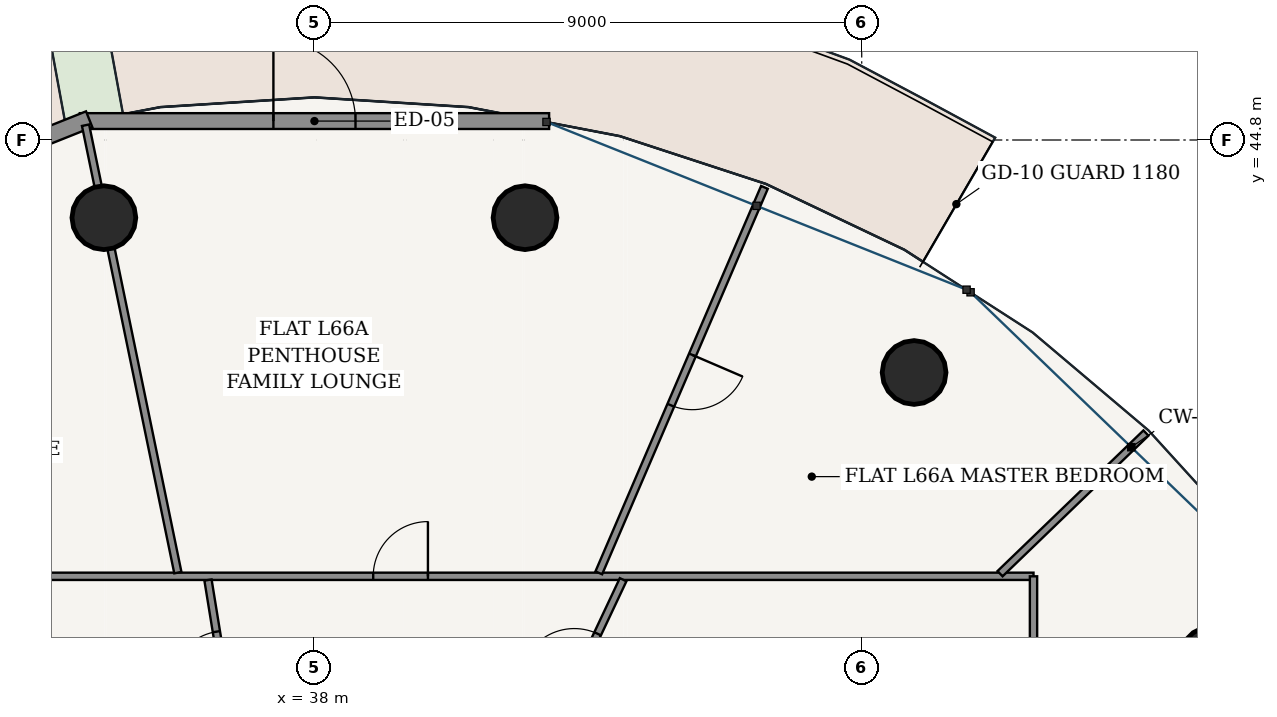
"""IFC4 building model, lengths in metres.
Left out: names, types, materials, properties, quantities, classifications, styles, units other than length and angle.
Written with IfcOpenShell. Run it as: python <this file> out.ifc"""

import sys

from ifc_helpers import new_model, si_unit, direction, frame, frame_2d, origin, origin_2d, place, context, subcontext, project, spatial, rectangle, hollow_circle, extrude, source, transform, mapped, element, fill, save


model = new_model("IFC4")
c1 = context("Model", 3, precision=1e-05, world=origin(), true_north=direction((-0.2419218956, 0.970295726276)))
c2 = subcontext(c1, "Body", "Model", "MODEL_VIEW")
j1 = project(units=[si_unit("LENGTHUNIT", "METRE"), si_unit("PLANEANGLEUNIT", "RADIAN")], contexts=[c1])
p1 = place(None, origin())
s1 = spatial("IfcSite", under=j1, at=p1, CompositionType="ELEMENT")
p2 = place(p1, origin())
s2 = spatial("IfcBuilding", under=s1, at=p2, CompositionType="ELEMENT")
p3 = place(p2, frame((0.0, 0.0, 251.95)))
s3 = spatial("IfcBuildingStorey", under=s2, at=p3, CompositionType="ELEMENT", Elevation=251.95)
for number, where, z_axis, x_axis in (
    (1, (52.759, 36.272, 0.0), (0.0, 0.0, 1.0), (1.0, 0.0, 0.0)),
    (2, (47.861, 40.977, 0.0), (0.0, 0.0, 1.0), (1.0, 0.0, 0.0)),
    (3, (41.463, 43.522, 0.0), (0.0, 0.0, 1.0), (1.0, 0.0, 0.0)),
    (4, (34.537, 43.522, 0.0), (0.0, 0.0, 1.0), (1.0, 0.0, 0.0)),
):
    element("IfcColumn", number, at=place(p3, frame(where, z_axis=z_axis, x_axis=x_axis)), inside=s3, PredefinedType="COLUMN", context=c2, shape_type="SweptSolid", body=[
        extrude(hollow_circle(Radius=0.525, WallThickness=0.035, at=origin_2d()), origin(), (0.0, 0.0, 1.0), 3.75),
    ])
p4 = place(p3, frame((41.859, 45.111, 0.0), z_axis=(0.0, 0.0, 1.0), x_axis=(-1.0, 0.0, 0.0)))
e5 = element("IfcWall", 5, at=p4, inside=s3, PredefinedType="SOLIDWALL", context=c2, shape_type="SweptSolid", body=[
    extrude(rectangle(XDim=7.718, YDim=0.26, at=frame_2d((3.859, 0.0))), origin(), (0.0, 0.0, 1.0), 3.49),
])
p5 = place(p4, frame((3.184, 0.0, 0.0)))
e6 = element("IfcOpeningElement", 6, at=p5, cuts=e5, PredefinedType="OPENING", context=c2, shape_type="SweptSolid", body=[
    extrude(rectangle(XDim=1.35, YDim=2.2, at=frame_2d((0.675, 1.1))), frame((0.0, 0.14, 0.0), z_axis=(0.0, -1.0, 0.0), x_axis=(1.0, 0.0, 0.0)), (0.0, 0.0, 1.0), 0.28),
])
p6 = place(p3, frame((34.295, 45.141, 0.0), z_axis=(0.0, 0.0, 1.0), x_axis=(-0.928724272392, -0.370771123296, 0.0)))
e7 = element("IfcWall", 7, at=p6, inside=s3, PredefinedType="SOLIDWALL", context=c2, shape_type="SweptSolid", body=[
    extrude(rectangle(XDim=7.678, YDim=0.28, at=frame_2d((3.839, 0.0))), origin(), (0.0, 0.0, 1.0), 3.49),
])
p7 = place(p6, frame((1.298, 0.0, 0.85)))
e8 = element("IfcOpeningElement", 8, at=p7, cuts=e7, PredefinedType="OPENING", context=c2, shape_type="SweptSolid", body=[
    extrude(rectangle(XDim=1.55, YDim=1.95, at=frame_2d((0.775, 0.975))), frame((0.0, 0.15, 0.0), z_axis=(0.0, -1.0, 0.0), x_axis=(1.0, 0.0, 0.0)), (0.0, 0.0, 1.0), 0.3),
])
p8 = place(p6, frame((4.83, 0.0, 0.85)))
e9 = element("IfcOpeningElement", 9, at=p8, cuts=e7, PredefinedType="OPENING", context=c2, shape_type="SweptSolid", body=[
    extrude(rectangle(XDim=1.55, YDim=1.95, at=frame_2d((0.775, 0.975))), frame((0.0, 0.15, 0.0), z_axis=(0.0, -1.0, 0.0), x_axis=(1.0, 0.0, 0.0)), (0.0, 0.0, 1.0), 0.3),
])
p9 = place(p3, frame((26.175, 37.625, 0.0), z_axis=(0.0, 0.0, 1.0), x_axis=(1.0, 0.0, 0.0)))
e10 = element("IfcWall", 10, at=p9, inside=s3, PredefinedType="PARTITIONING", context=c2, shape_type="SweptSolid", body=[
    extrude(rectangle(XDim=23.65, YDim=0.12, at=frame_2d((11.825, 0.0))), origin(), (0.0, 0.0, 1.0), 3.015),
])
p10 = place(p9, frame((12.791, 0.0, 0.0)))
e11 = element("IfcOpeningElement", 11, at=p10, cuts=e10, PredefinedType="OPENING", context=c2, shape_type="SweptSolid", body=[
    extrude(rectangle(XDim=0.9, YDim=2.15, at=frame_2d((0.45, 1.075))), frame((0.0, 0.07, 0.0), z_axis=(0.0, -1.0, 0.0), x_axis=(1.0, 0.0, 0.0)), (0.0, 0.0, 1.0), 0.14),
])
p11 = place(p9, frame((6.48, 0.0, 0.0)))
e12 = element("IfcOpeningElement", 12, at=p11, cuts=e10, PredefinedType="OPENING", context=c2, shape_type="SweptSolid", body=[
    extrude(rectangle(XDim=0.9, YDim=2.15, at=frame_2d((0.45, 1.075))), frame((0.0, 0.07, 0.0), z_axis=(0.0, -1.0, 0.0), x_axis=(1.0, 0.0, 0.0)), (0.0, 0.0, 1.0), 0.14),
])
p12 = place(p9, frame((1.831, 0.0, 0.0)))
e13 = element("IfcOpeningElement", 13, at=p12, cuts=e10, PredefinedType="OPENING", context=c2, shape_type="SweptSolid", body=[
    extrude(rectangle(XDim=0.9, YDim=2.15, at=frame_2d((0.45, 1.075))), frame((0.0, 0.07, 0.0), z_axis=(0.0, -1.0, 0.0), x_axis=(1.0, 0.0, 0.0)), (0.0, 0.0, 1.0), 0.14),
])
p13 = place(p3, frame((49.825, 37.625, 0.0), z_axis=(0.0, 0.0, 1.0), x_axis=(0.0, -1.0, 0.0)))
e14 = element("IfcWall", 14, at=p13, inside=s3, PredefinedType="PARTITIONING", context=c2, shape_type="SweptSolid", body=[
    extrude(rectangle(XDim=3.615, YDim=0.12, at=frame_2d((1.808, 0.0))), origin(), (0.0, 0.0, 1.0), 3.015),
])
p14 = place(p3, frame((49.275, 37.668, 0.0), z_axis=(0.0, 0.0, 1.0), x_axis=(0.719954096891, 0.694021684366, 0.0)))
e15 = element("IfcWall", 15, at=p14, inside=s3, PredefinedType="PARTITIONING", context=c2, shape_type="SweptSolid", body=[
    extrude(rectangle(XDim=3.333, YDim=0.12, at=frame_2d((1.667, 0.0))), origin(), (0.0, 0.0, 1.0), 3.121),
])
p15 = place(p3, frame((42.676, 37.682, 0.0), z_axis=(0.0, 0.0, 1.0), x_axis=(0.394777489933, 0.918776759307, 0.0)))
e16 = element("IfcWall", 16, at=p15, inside=s3, PredefinedType="PARTITIONING", context=c2, shape_type="SweptSolid", body=[
    extrude(rectangle(XDim=6.9, YDim=0.12, at=frame_2d((3.45, 0.0))), origin(), (0.0, 0.0, 1.0), 3.121),
])
p16 = place(p15, frame((3.0, 0.0, 0.0)))
e17 = element("IfcOpeningElement", 17, at=p16, cuts=e16, PredefinedType="OPENING", context=c2, shape_type="SweptSolid", body=[
    extrude(rectangle(XDim=0.9, YDim=2.15, at=frame_2d((0.45, 1.075))), frame((0.0, 0.07, 0.0), z_axis=(0.0, -1.0, 0.0), x_axis=(1.0, 0.0, 0.0)), (0.0, 0.0, 1.0), 0.14),
])
p17 = place(p3, frame((35.754, 37.686, 0.0), z_axis=(0.0, 0.0, 1.0), x_axis=(-0.202105877204, 0.979363678313, 0.0)))
e18 = element("IfcWall", 18, at=p17, inside=s3, PredefinedType="PARTITIONING", context=c2, shape_type="SweptSolid", body=[
    extrude(rectangle(XDim=7.512, YDim=0.12, at=frame_2d((3.756, 0.0))), origin(), (0.0, 0.0, 1.0), 3.015),
])
p18 = place(p3, frame((41.854, 34.977, 0.0), z_axis=(0.0, 0.0, 1.0), x_axis=(0.42640827804, 0.904530806783, 0.0)))
e19 = element("IfcWall", 19, at=p18, inside=s3, PredefinedType="PARTITIONING", context=c2, shape_type="SweptSolid", body=[
    extrude(rectangle(XDim=2.866, YDim=0.12, at=frame_2d((1.433, 0.0))), origin(), (0.0, 0.0, 1.0), 3.49),
])
p19 = place(p18, frame((0.983, 0.0, 0.0)))
e20 = element("IfcOpeningElement", 20, at=p19, cuts=e19, PredefinedType="OPENING", context=c2, shape_type="SweptSolid", body=[
    extrude(rectangle(XDim=0.9, YDim=2.15, at=frame_2d((0.45, 1.075))), frame((0.0, 0.07, 0.0), z_axis=(0.0, -1.0, 0.0), x_axis=(1.0, 0.0, 0.0)), (0.0, 0.0, 1.0), 0.14),
])
p20 = place(p3, frame((36.67, 34.977, 0.0), z_axis=(0.0, 0.0, 1.0), x_axis=(-0.160605953374, 0.98701860557, 0.0)))
e21 = element("IfcWall", 21, at=p20, inside=s3, PredefinedType="PARTITIONING", context=c2, shape_type="SweptSolid", body=[
    extrude(rectangle(XDim=2.621, YDim=0.12, at=frame_2d((1.31, 0.0))), origin(), (0.0, 0.0, 1.0), 2.575),
])
p21 = place(p20, frame((0.86, 0.0, 0.0)))
e22 = element("IfcOpeningElement", 22, at=p21, cuts=e21, PredefinedType="OPENING", context=c2, shape_type="SweptSolid", body=[
    extrude(rectangle(XDim=0.9, YDim=2.15, at=frame_2d((0.45, 1.075))), frame((0.0, 0.07, 0.0), z_axis=(0.0, -1.0, 0.0), x_axis=(1.0, 0.0, 0.0)), (0.0, 0.0, 1.0), 0.14),
])
m1 = source(origin(), c2, "Body", "SweptSolid", [
    extrude(rectangle(XDim=1.35, YDim=2.2, at=frame_2d((0.675, 1.1))), frame((0.0, 0.025, 0.0), z_axis=(0.0, -1.0, 0.0), x_axis=(1.0, 0.0, 0.0)), (0.0, 0.0, 1.0), 0.05),
])
p22 = place(p5, frame((1.35, 0.0, 0.0), z_axis=(0.0, 0.0, 1.0), x_axis=(-1.0, 0.0, 0.0)))
e23 = element("IfcDoor", 23, at=p22, inside=s3, OperationType="SINGLE_SWING_LEFT", PredefinedType="DOOR", context=c2, shape_type="MappedRepresentation", body=[
    mapped(m1, transform((0.0, 0.0, 0.0), scale=1.0)),
])
fill(e6, e23)
m2 = source(origin(), c2, "Body", "SweptSolid", [
    extrude(rectangle(XDim=0.9, YDim=2.15, at=frame_2d((0.45, 1.075))), frame((0.0, 0.025, 0.0), z_axis=(0.0, -1.0, 0.0), x_axis=(1.0, 0.0, 0.0)), (0.0, 0.0, 1.0), 0.05),
])
p23 = place(p19, origin())
e24 = element("IfcDoor", 24, at=p23, inside=s3, OperationType="SINGLE_SWING_LEFT", PredefinedType="DOOR", context=c2, shape_type="MappedRepresentation", body=[
    mapped(m2, transform((0.0, 0.0, 0.0), scale=1.0)),
])
fill(e20, e24)
p24 = place(p10, origin())
e25 = element("IfcDoor", 25, at=p24, inside=s3, OperationType="SINGLE_SWING_RIGHT", PredefinedType="DOOR", context=c2, shape_type="MappedRepresentation", body=[
    mapped(m2, transform((0.0, 0.0, 0.0), scale=1.0)),
])
fill(e11, e25)
p25 = place(p21, origin())
e26 = element("IfcDoor", 26, at=p25, inside=s3, OperationType="SINGLE_SWING_LEFT", PredefinedType="DOOR", context=c2, shape_type="MappedRepresentation", body=[
    mapped(m2, transform((0.0, 0.0, 0.0), scale=1.0)),
])
fill(e22, e26)
p26 = place(p16, frame((0.9, 0.0, 0.0), z_axis=(0.0, 0.0, 1.0), x_axis=(-1.0, 0.0, 0.0)))
e27 = element("IfcDoor", 27, at=p26, inside=s3, OperationType="SINGLE_SWING_LEFT", PredefinedType="DOOR", context=c2, shape_type="MappedRepresentation", body=[
    mapped(m2, transform((0.0, 0.0, 0.0), scale=1.0)),
])
fill(e17, e27)
save(model, sys.argv[1])
